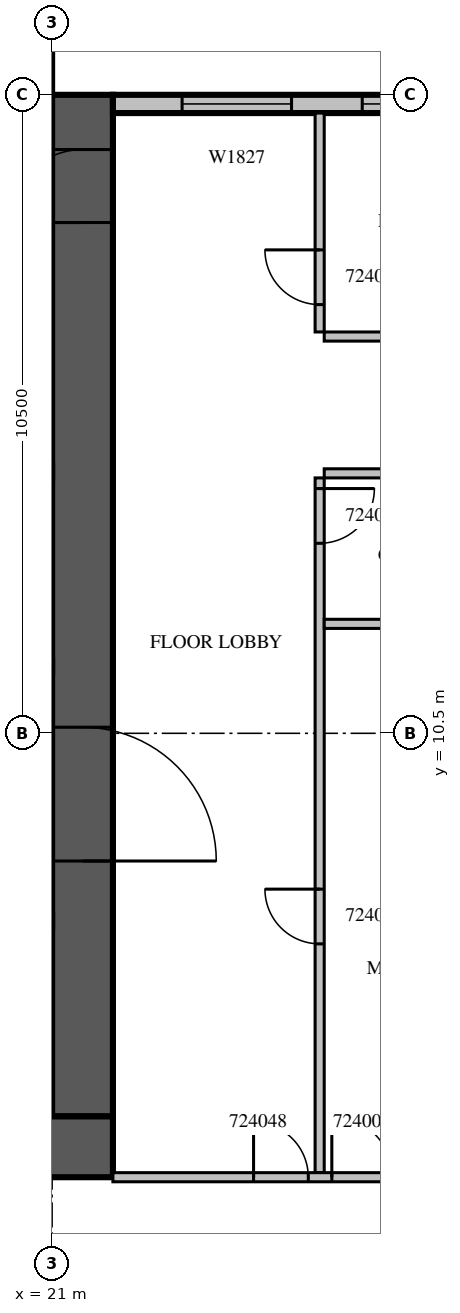
"""IFC4 building model, lengths in metres.
Left out: names, types, materials, properties, quantities, classifications, styles, units other than length and angle.
Written with IfcOpenShell. Run it as: python <this file> out.ifc"""

import sys

from ifc_helpers import new_model, si_unit, direction, frame, frame_2d, origin, place, context, subcontext, project, spatial, rectangle, extrude, source, transform, mapped, element, fill, save


model = new_model("IFC4")
c1 = context("Model", 3, precision=1e-05, world=origin(), true_north=direction((0.0, 1.0)))
c2 = subcontext(c1, "Body", "Model", "MODEL_VIEW")
j1 = project(units=[si_unit("LENGTHUNIT", "METRE"), si_unit("PLANEANGLEUNIT", "RADIAN")], contexts=[c1])
p1 = place(None, origin())
s1 = spatial("IfcSite", under=j1, at=p1, CompositionType="ELEMENT")
p2 = place(p1, origin())
s2 = spatial("IfcBuilding", under=s1, at=p2, CompositionType="ELEMENT")
p3 = place(p2, frame((0.0, 0.0, 111.9)))
s3 = spatial("IfcBuildingStorey", under=s2, at=p3, CompositionType="ELEMENT", Elevation=111.9)
m1 = source(origin(), c2, "Body", "SweptSolid", [
    extrude(rectangle(XDim=16.8, YDim=1.0, at=frame_2d((8.4, 0.0))), origin(), (0.0, 0.0, 1.0), 4.2),
])
p4 = place(p3, frame((21.5, 4.2, 0.0), z_axis=(0.0, 0.0, 1.0), x_axis=(0.0, 1.0, 0.0)))
e1 = element("IfcWall", 1, at=p4, inside=s3, PredefinedType="SHEAR", context=c2, shape_type="MappedRepresentation", body=[
    mapped(m1, transform((0.0, 0.0, 0.0), scale=1.0)),
])
m2 = source(origin(), c2, "Body", "SweptSolid", [
    extrude(rectangle(XDim=2.2, YDim=2.1, at=frame_2d((1.1, 1.05))), frame((0.0, 0.51, 0.0), z_axis=(0.0, -1.0, 0.0), x_axis=(1.0, 0.0, 0.0)), (0.0, 0.0, 1.0), 1.02),
])
p5 = place(p4, frame((4.2, 0.0, 0.0)))
e2 = element("IfcOpeningElement", 2, at=p5, cuts=e1, PredefinedType="OPENING", context=c2, shape_type="MappedRepresentation", body=[
    mapped(m2, transform((0.0, 0.0, 0.0), scale=1.0)),
])
m3 = source(origin(), c2, "Body", "SweptSolid", [
    extrude(rectangle(XDim=1.2, YDim=2.1, at=frame_2d((0.6, 1.05))), frame((0.0, 0.51, 0.0), z_axis=(0.0, -1.0, 0.0), x_axis=(1.0, 0.0, 0.0)), (0.0, 0.0, 1.0), 1.02),
])
p6 = place(p4, frame((14.7, 0.0, 0.0)))
e3 = element("IfcOpeningElement", 3, at=p6, cuts=e1, PredefinedType="OPENING", context=c2, shape_type="MappedRepresentation", body=[
    mapped(m3, transform((0.0, 0.0, 0.0), scale=1.0)),
])
m4 = source(origin(), c2, "Body", "SweptSolid", [
    extrude(rectangle(XDim=17.8, YDim=1.0, at=frame_2d((8.9, 0.0))), origin(), (0.0, 0.0, 1.0), 4.2),
])
p7 = place(p3, frame((4.2, 3.7, 0.0), z_axis=(0.0, 0.0, 1.0), x_axis=(1.0, 0.0, 0.0)))
e4 = element("IfcWall", 4, at=p7, inside=s3, PredefinedType="SHEAR", context=c2, shape_type="MappedRepresentation", body=[
    mapped(m4, transform((0.0, 0.0, 0.0), scale=1.0)),
])
m5 = source(origin(), c2, "Body", "SweptSolid", [
    extrude(rectangle(XDim=6.875, YDim=0.3, at=frame_2d((3.438, 0.0))), origin(), (0.0, 0.0, 1.0), 3.8),
])
p8 = place(p3, frame((28.875, 20.85, 0.0), z_axis=(0.0, 0.0, 1.0), x_axis=(-1.0, 0.0, 0.0)))
e5 = element("IfcWall", 5, at=p8, inside=s3, PredefinedType="STANDARD", context=c2, shape_type="MappedRepresentation", body=[
    mapped(m5, transform((0.0, 0.0, 0.0), scale=1.0)),
])
m6 = source(origin(), c2, "Body", "SweptSolid", [
    extrude(rectangle(XDim=2.4, YDim=2.7, at=frame_2d((1.2, 1.35))), frame((0.0, 0.16, 0.0), z_axis=(0.0, -1.0, 0.0), x_axis=(1.0, 0.0, 0.0)), (0.0, 0.0, 1.0), 0.32),
])
p9 = place(p8, frame((0.375, 0.0, 0.6)))
e6 = element("IfcOpeningElement", 6, at=p9, cuts=e5, PredefinedType="OPENING", context=c2, shape_type="MappedRepresentation", body=[
    mapped(m6, transform((0.0, 0.0, 0.0), scale=1.0)),
])
m7 = source(origin(), c2, "Body", "SweptSolid", [
    extrude(rectangle(XDim=1.8, YDim=2.7, at=frame_2d((0.9, 1.35))), frame((0.0, 0.16, 0.0), z_axis=(0.0, -1.0, 0.0), x_axis=(1.0, 0.0, 0.0)), (0.0, 0.0, 1.0), 0.32),
])
p10 = place(p8, frame((3.938, 0.0, 0.6)))
e7 = element("IfcOpeningElement", 7, at=p10, cuts=e5, PredefinedType="OPENING", context=c2, shape_type="MappedRepresentation", body=[
    mapped(m7, transform((0.0, 0.0, 0.0), scale=1.0)),
])
p11 = place(p3, frame((25.4, 14.7, 0.0), z_axis=(0.0, 0.0, 1.0), x_axis=(0.0, -1.0, 0.0)))
e8 = element("IfcWall", 8, at=p11, inside=s3, PredefinedType="PARTITIONING", context=c2, shape_type="SweptSolid", body=[
    extrude(rectangle(XDim=11.425, YDim=0.15, at=frame_2d((5.713, 0.0))), origin(), (0.0, 0.0, 1.0), 3.8),
])
m8 = source(origin(), c2, "Body", "SweptSolid", [
    extrude(rectangle(XDim=0.9, YDim=2.1, at=frame_2d((0.45, 1.05))), frame((0.0, 0.085, 0.0), z_axis=(0.0, -1.0, 0.0), x_axis=(1.0, 0.0, 0.0)), (0.0, 0.0, 1.0), 0.17),
])
p12 = place(p11, frame((6.763, 0.0, 0.0)))
e9 = element("IfcOpeningElement", 9, at=p12, cuts=e8, PredefinedType="OPENING", context=c2, shape_type="MappedRepresentation", body=[
    mapped(m8, transform((0.0, 0.0, 0.0), scale=1.0)),
])
p13 = place(p11, frame((0.175, 0.0, 0.0)))
e10 = element("IfcOpeningElement", 10, at=p13, cuts=e8, PredefinedType="OPENING", context=c2, shape_type="MappedRepresentation", body=[
    mapped(m8, transform((0.0, 0.0, 0.0), scale=1.0)),
])
m9 = source(origin(), c2, "Body", "SweptSolid", [
    extrude(rectangle(XDim=3.6, YDim=0.15, at=frame_2d((1.8, 0.0))), origin(), (0.0, 0.0, 1.0), 3.8),
])
p14 = place(p3, frame((25.4, 20.7, 0.0), z_axis=(0.0, 0.0, 1.0), x_axis=(0.0, -1.0, 0.0)))
e11 = element("IfcWall", 11, at=p14, inside=s3, PredefinedType="PARTITIONING", context=c2, shape_type="MappedRepresentation", body=[
    mapped(m9, transform((0.0, 0.0, 0.0), scale=1.0)),
])
p15 = place(p14, frame((2.25, 0.0, 0.0)))
e12 = element("IfcOpeningElement", 12, at=p15, cuts=e11, PredefinedType="OPENING", context=c2, shape_type="MappedRepresentation", body=[
    mapped(m8, transform((0.0, 0.0, 0.0), scale=1.0)),
])
m10 = source(origin(), c2, "Body", "SweptSolid", [
    extrude(rectangle(XDim=3.85, YDim=0.15, at=frame_2d((1.925, 0.0))), origin(), (0.0, 0.0, 1.0), 3.8),
])
for number, where, z_axis, x_axis in (
    (13, (29.325, 12.3, 0.0), (0.0, 0.0, 1.0), (-1.0, 0.0, 0.0)),
    (14, (29.325, 14.775, 0.0), (0.0, 0.0, 1.0), (-1.0, 0.0, 0.0)),
    (15, (25.475, 17.025, 0.0), (0.0, 0.0, 1.0), (1.0, 0.0, 0.0)),
):
    element("IfcWall", number, at=place(p3, frame(where, z_axis=z_axis, x_axis=x_axis)), inside=s3, PredefinedType="PARTITIONING", context=c2, shape_type="MappedRepresentation", body=[
        mapped(m10, transform((0.0, 0.0, 0.0), scale=1.0)),
    ])
p16 = place(p3, frame((22.0, 3.2, 0.0), z_axis=(0.0, 0.0, 1.0), x_axis=(1.0, 0.0, 0.0)))
e16 = element("IfcWall", 16, at=p16, inside=s3, PredefinedType="PARTITIONING", context=c2, shape_type="SweptSolid", body=[
    extrude(rectangle(XDim=7.325, YDim=0.15, at=frame_2d((3.663, 0.0))), origin(), (0.0, 0.0, 1.0), 3.8),
])
m11 = source(origin(), c2, "Body", "SweptSolid", [
    extrude(rectangle(XDim=1.0, YDim=2.1, at=frame_2d((0.5, 1.05))), frame((0.0, 0.085, 0.0), z_axis=(0.0, -1.0, 0.0), x_axis=(1.0, 0.0, 0.0)), (0.0, 0.0, 1.0), 0.17),
])
p17 = place(p16, frame((3.6, 0.0, 0.0)))
e17 = element("IfcOpeningElement", 17, at=p17, cuts=e16, PredefinedType="OPENING", context=c2, shape_type="MappedRepresentation", body=[
    mapped(m11, transform((0.0, 0.0, 0.0), scale=1.0)),
])
p18 = place(p16, frame((2.313, 0.0, 0.0)))
e18 = element("IfcOpeningElement", 18, at=p18, cuts=e16, PredefinedType="OPENING", context=c2, shape_type="MappedRepresentation", body=[
    mapped(m8, transform((0.0, 0.0, 0.0), scale=1.0)),
])
m12 = source(origin(), c2, "Body", "SweptSolid", [
    extrude(rectangle(XDim=2.4, YDim=2.7, at=frame_2d((1.2, 1.35))), frame((0.0, 0.03, 0.0), z_axis=(0.0, -1.0, 0.0), x_axis=(1.0, 0.0, 0.0)), (0.0, 0.0, 1.0), 0.06),
])
p19 = place(p9, origin())
e19 = element("IfcWindow", 19, at=p19, inside=s3, PartitioningType="SINGLE_PANEL", PredefinedType="WINDOW", context=c2, shape_type="MappedRepresentation", body=[
    mapped(m12, transform((0.0, 0.0, 0.0), scale=1.0)),
])
fill(e6, e19)
m13 = source(origin(), c2, "Body", "SweptSolid", [
    extrude(rectangle(XDim=1.8, YDim=2.7, at=frame_2d((0.9, 1.35))), frame((0.0, 0.03, 0.0), z_axis=(0.0, -1.0, 0.0), x_axis=(1.0, 0.0, 0.0)), (0.0, 0.0, 1.0), 0.06),
])
p20 = place(p10, origin())
e20 = element("IfcWindow", 20, at=p20, inside=s3, PartitioningType="SINGLE_PANEL", PredefinedType="WINDOW", context=c2, shape_type="MappedRepresentation", body=[
    mapped(m13, transform((0.0, 0.0, 0.0), scale=1.0)),
])
fill(e7, e20)
m14 = source(origin(), c2, "Body", "SweptSolid", [
    extrude(rectangle(XDim=2.2, YDim=2.1, at=frame_2d((1.1, 1.05))), frame((0.0, 0.025, 0.0), z_axis=(0.0, -1.0, 0.0), x_axis=(1.0, 0.0, 0.0)), (0.0, 0.0, 1.0), 0.05),
])
p21 = place(p5, origin())
e21 = element("IfcDoor", 21, at=p21, inside=s3, OperationType="DOUBLE_DOOR_SINGLE_SWING", PredefinedType="DOOR", context=c2, shape_type="MappedRepresentation", body=[
    mapped(m14, transform((0.0, 0.0, 0.0), scale=1.0)),
])
fill(e2, e21)
m15 = source(origin(), c2, "Body", "SweptSolid", [
    extrude(rectangle(XDim=1.2, YDim=2.1, at=frame_2d((0.6, 1.05))), frame((0.0, 0.025, 0.0), z_axis=(0.0, -1.0, 0.0), x_axis=(1.0, 0.0, 0.0)), (0.0, 0.0, 1.0), 0.05),
])
p22 = place(p6, origin())
e22 = element("IfcDoor", 22, at=p22, inside=s3, OperationType="SINGLE_SWING_LEFT", PredefinedType="DOOR", context=c2, shape_type="MappedRepresentation", body=[
    mapped(m15, transform((0.0, 0.0, 0.0), scale=1.0)),
])
fill(e3, e22)
m16 = source(origin(), c2, "Body", "SweptSolid", [
    extrude(rectangle(XDim=0.9, YDim=2.1, at=frame_2d((0.45, 1.05))), frame((0.0, 0.025, 0.0), z_axis=(0.0, -1.0, 0.0), x_axis=(1.0, 0.0, 0.0)), (0.0, 0.0, 1.0), 0.05),
])
p23 = place(p12, origin())
e23 = element("IfcDoor", 23, at=p23, inside=s3, OperationType="SINGLE_SWING_RIGHT", PredefinedType="DOOR", context=c2, shape_type="MappedRepresentation", body=[
    mapped(m16, transform((0.0, 0.0, 0.0), scale=1.0)),
])
fill(e9, e23)
p24 = place(p13, origin())
e24 = element("IfcDoor", 24, at=p24, inside=s3, OperationType="SINGLE_SWING_LEFT", PredefinedType="DOOR", context=c2, shape_type="MappedRepresentation", body=[
    mapped(m16, transform((0.0, 0.0, 0.0), scale=1.0)),
])
fill(e10, e24)
p25 = place(p15, origin())
e25 = element("IfcDoor", 25, at=p25, inside=s3, OperationType="SINGLE_SWING_RIGHT", PredefinedType="DOOR", context=c2, shape_type="MappedRepresentation", body=[
    mapped(m16, transform((0.0, 0.0, 0.0), scale=1.0)),
])
fill(e12, e25)
m17 = source(origin(), c2, "Body", "SweptSolid", [
    extrude(rectangle(XDim=1.0, YDim=2.1, at=frame_2d((0.5, 1.05))), frame((0.0, 0.025, 0.0), z_axis=(0.0, -1.0, 0.0), x_axis=(1.0, 0.0, 0.0)), (0.0, 0.0, 1.0), 0.05),
])
p26 = place(p17, origin())
e26 = element("IfcDoor", 26, at=p26, inside=s3, OperationType="SINGLE_SWING_LEFT", PredefinedType="DOOR", context=c2, shape_type="MappedRepresentation", body=[
    mapped(m17, transform((0.0, 0.0, 0.0), scale=1.0)),
])
fill(e17, e26)
p27 = place(p18, origin())
e27 = element("IfcDoor", 27, at=p27, inside=s3, OperationType="SINGLE_SWING_LEFT", PredefinedType="DOOR", context=c2, shape_type="MappedRepresentation", body=[
    mapped(m16, transform((0.0, 0.0, 0.0), scale=1.0)),
])
fill(e18, e27)
save(model, sys.argv[1])
